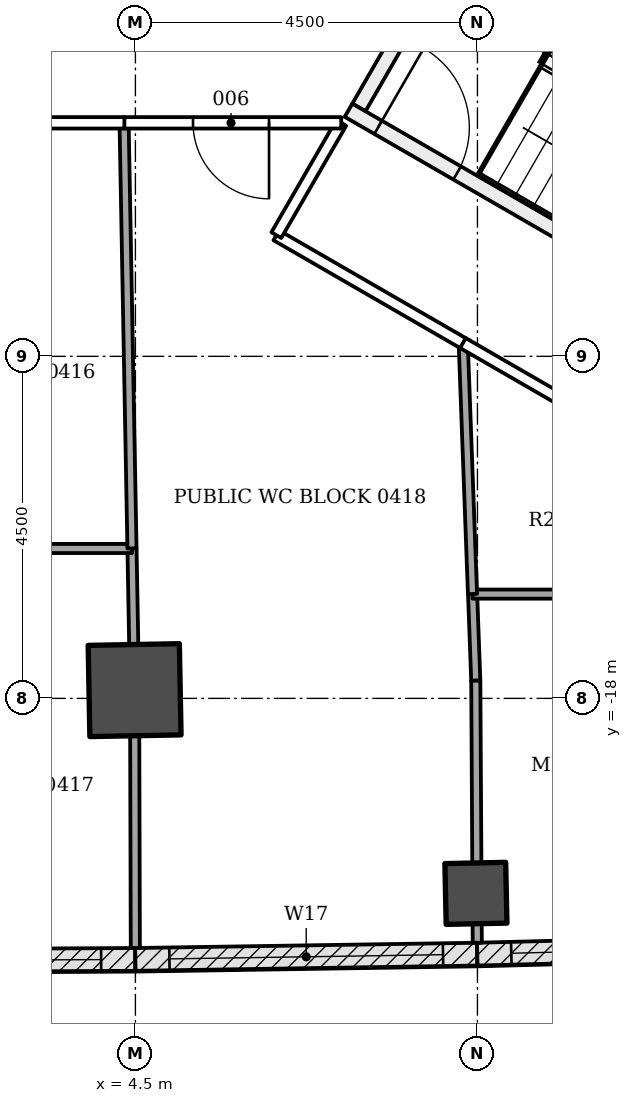
"""IFC4 building model, lengths in metres.
Left out: names, types, materials, properties, quantities, classifications, styles, units other than length and angle.
Written with IfcOpenShell. Run it as: python <this file> out.ifc"""

import sys

from ifc_helpers import new_model, si_unit, direction, frame, frame_2d, origin, origin_2d, place, context, subcontext, project, spatial, rectangle, extrude, element, fill, save


model = new_model("IFC4")
c1 = context("Model", 3, precision=1e-05, world=origin(), true_north=direction((0.0, 1.0)))
c2 = subcontext(c1, "Body", "Model", "MODEL_VIEW")
j1 = project(units=[si_unit("LENGTHUNIT", "METRE"), si_unit("PLANEANGLEUNIT", "RADIAN")], contexts=[c1])
p1 = place(None, origin())
s1 = spatial("IfcSite", under=j1, at=p1, CompositionType="ELEMENT")
p2 = place(p1, origin())
s2 = spatial("IfcBuilding", under=s1, at=p2, CompositionType="ELEMENT")
p3 = place(p2, frame((0.0, 0.0, 19.5)))
s3 = spatial("IfcBuildingStorey", under=s2, at=p3, CompositionType="ELEMENT", Elevation=19.5)
p4 = place(p3, frame((4.49, -17.892, -0.25), z_axis=(0.0, 0.0, 1.0), x_axis=(0.018552831126, -0.999827881416, 0.0)))
e1 = element("IfcColumn", 1, at=p4, inside=s3, PredefinedType="COLUMN", context=c2, shape_type="SweptSolid", body=[
    extrude(rectangle(XDim=1.2, YDim=1.2, at=origin_2d()), origin(), (0.0, 0.0, 1.0), 4.55),
])
p5 = place(p3, frame((8.98, -20.565, -0.25), z_axis=(0.0, 0.0, 1.0), x_axis=(0.020537122929, -0.99978909105, 0.0)))
e2 = element("IfcColumn", 2, at=p5, inside=s3, PredefinedType="COLUMN", context=c2, shape_type="SweptSolid", body=[
    extrude(rectangle(XDim=0.8, YDim=0.8, at=origin_2d()), origin(), (0.0, 0.0, 1.0), 4.55),
])
p6 = place(p3, frame((9.922, -5.728, -0.25), z_axis=(0.0, 0.0, 1.0), x_axis=(0.866028046028, -0.499995423472, 0.0)))
e3 = element("IfcWall", 3, at=p6, inside=s3, PredefinedType="SHEAR", context=c2, shape_type="SweptSolid", body=[
    extrude(rectangle(XDim=14.633, YDim=0.9, at=frame_2d((7.316, 0.0))), origin(), (0.0, 0.0, 1.0), 4.55),
])
p7 = place(p6, frame((7.35, 0.0, 0.25)))
e4 = element("IfcOpeningElement", 4, at=p7, cuts=e3, PredefinedType="OPENING", context=c2, shape_type="SweptSolid", body=[
    extrude(rectangle(XDim=1.5, YDim=2.1, at=frame_2d((0.75, 1.05))), frame((0.0, 0.46, 0.0), z_axis=(0.0, -1.0, 0.0), x_axis=(1.0, 0.0, 0.0)), (0.0, 0.0, 1.0), 0.92),
])
p8 = place(p3, frame((4.497, -21.434, 0.0), z_axis=(0.0, 0.0, 1.0), x_axis=(-0.999986693461, -0.005158769258, 0.0)))
e5 = element("IfcWall", 5, at=p8, inside=s3, PredefinedType="NOTDEFINED", context=c2, shape_type="SweptSolid", body=[
    extrude(rectangle(XDim=4.496, YDim=0.3, at=frame_2d((2.248, 0.0))), origin(), (0.0, 0.0, 1.0), 4.3),
])
p9 = place(p8, frame((0.448, 0.0, 1.5)))
e6 = element("IfcOpeningElement", 6, at=p9, cuts=e5, PredefinedType="OPENING", context=c2, shape_type="SweptSolid", body=[
    extrude(rectangle(XDim=3.6, YDim=1.8, at=frame_2d((1.8, 0.9))), frame((0.0, 0.16, 0.0), z_axis=(0.0, -1.0, 0.0), x_axis=(1.0, 0.0, 0.0)), (0.0, 0.0, 1.0), 0.32),
])
p10 = place(p3, frame((8.995, -21.365, 0.0), z_axis=(0.0, 0.0, 1.0), x_axis=(-0.999881921814, -0.015366926462, 0.0)))
e7 = element("IfcWall", 7, at=p10, inside=s3, PredefinedType="NOTDEFINED", context=c2, shape_type="SweptSolid", body=[
    extrude(rectangle(XDim=4.496, YDim=0.3, at=frame_2d((2.248, 0.0))), origin(), (0.0, 0.0, 1.0), 4.3),
])
p11 = place(p10, frame((0.448, 0.0, 1.5)))
e8 = element("IfcOpeningElement", 8, at=p11, cuts=e7, PredefinedType="OPENING", context=c2, shape_type="SweptSolid", body=[
    extrude(rectangle(XDim=3.6, YDim=1.8, at=frame_2d((1.8, 0.9))), frame((0.0, 0.16, 0.0), z_axis=(0.0, -1.0, 0.0), x_axis=(1.0, 0.0, 0.0)), (0.0, 0.0, 1.0), 0.32),
])
p12 = place(p3, frame((13.492, -21.25, 0.0), z_axis=(0.0, 0.0, 1.0), x_axis=(-0.999671466587, -0.025631209312, 0.0)))
e9 = element("IfcWall", 9, at=p12, inside=s3, PredefinedType="NOTDEFINED", context=c2, shape_type="SweptSolid", body=[
    extrude(rectangle(XDim=4.496, YDim=0.3, at=frame_2d((2.248, 0.0))), origin(), (0.0, 0.0, 1.0), 4.3),
])
p13 = place(p12, frame((0.448, 0.0, 1.5)))
e10 = element("IfcOpeningElement", 10, at=p13, cuts=e9, PredefinedType="OPENING", context=c2, shape_type="SweptSolid", body=[
    extrude(rectangle(XDim=3.6, YDim=1.8, at=frame_2d((1.8, 0.9))), frame((0.0, 0.16, 0.0), z_axis=(0.0, -1.0, 0.0), x_axis=(1.0, 0.0, 0.0)), (0.0, 0.0, 1.0), 0.32),
])
p14 = place(p3, frame((7.44, -10.226, -0.25), z_axis=(0.0, 0.0, 1.0), x_axis=(0.500022077904, 0.866012656725, 0.0)))
e11 = element("IfcWall", 11, at=p14, inside=s3, PredefinedType="SHEAR", context=c2, shape_type="SweptSolid", body=[
    extrude(rectangle(XDim=3.55, YDim=0.2, at=frame_2d((1.775, 0.0))), origin(), (0.0, 0.0, 1.0), 4.55),
])
p15 = place(p14, frame((1.175, 0.0, 0.25)))
e12 = element("IfcOpeningElement", 12, at=p15, cuts=e11, PredefinedType="OPENING", context=c2, shape_type="SweptSolid", body=[
    extrude(rectangle(XDim=1.2, YDim=2.1, at=frame_2d((0.6, 1.05))), frame((0.0, 0.11, 0.0), z_axis=(0.0, -1.0, 0.0), x_axis=(1.0, 0.0, 0.0)), (0.0, 0.0, 1.0), 0.22),
])
p16 = place(p3, frame((7.304, -10.262, -0.25), z_axis=(0.0, 0.0, 1.0), x_axis=(0.866026594901, -0.49999793692, 0.0)))
e13 = element("IfcWall", 13, at=p16, inside=s3, PredefinedType="SHEAR", context=c2, shape_type="SweptSolid", body=[
    extrude(rectangle(XDim=5.6, YDim=0.2, at=frame_2d((2.8, 0.0))), origin(), (0.0, 0.0, 1.0), 4.55),
])
p17 = place(p16, frame((0.45, 0.0, 0.25)))
e14 = element("IfcOpeningElement", 14, at=p17, cuts=e13, PredefinedType="OPENING", context=c2, shape_type="SweptSolid", body=[
    extrude(rectangle(XDim=1.2, YDim=2.1, at=frame_2d((0.6, 1.05))), frame((0.0, 0.11, 0.0), z_axis=(0.0, -1.0, 0.0), x_axis=(1.0, 0.0, 0.0)), (0.0, 0.0, 1.0), 0.22),
])
p18 = place(p3, frame((9.413, -6.61, -0.25), z_axis=(0.0, 0.0, 1.0), x_axis=(0.866018442252, -0.500012057535, 0.0)))
e15 = element("IfcWall", 15, at=p18, inside=s3, PredefinedType="SHEAR", context=c2, shape_type="SweptSolid", body=[
    extrude(rectangle(XDim=7.2, YDim=1.136, at=frame_2d((3.6, 0.0))), origin(), (0.0, 0.0, 1.0), 4.55),
])
p19 = place(p3, frame((4.478, -17.291, 0.0), z_axis=(0.0, 0.0, 1.0), x_axis=(-0.018108783452, 0.999836022537, 0.0)))
e16 = element("IfcWall", 16, at=p19, inside=s3, PredefinedType="PARTITIONING", context=c2, shape_type="SweptSolid", body=[
    extrude(rectangle(XDim=1.267, YDim=0.12, at=frame_2d((0.634, 0.0))), origin(), (0.0, 0.0, 1.0), 3.698),
])
p20 = place(p3, frame((4.499, -21.284, 0.0), z_axis=(0.0, 0.0, 1.0), x_axis=(-0.00288561233, 0.999995836612, 0.0)))
e17 = element("IfcWall", 17, at=p20, inside=s3, PredefinedType="PARTITIONING", context=c2, shape_type="SweptSolid", body=[
    extrude(rectangle(XDim=2.792, YDim=0.12, at=frame_2d((1.396, 0.0))), origin(), (0.0, 0.0, 1.0), 3.683),
])
p21 = place(p3, frame((4.455, -16.028, 0.0), z_axis=(0.0, 0.0, 1.0), x_axis=(-1.0, 0.0, 0.0)))
e18 = element("IfcWall", 18, at=p21, inside=s3, PredefinedType="PARTITIONING", context=c2, shape_type="SweptSolid", body=[
    extrude(rectangle(XDim=4.455, YDim=0.12, at=frame_2d((2.228, 0.0))), origin(), (0.0, 0.0, 1.0), 3.688),
])
p22 = place(p21, frame((1.75, 0.0, 0.0)))
e19 = element("IfcOpeningElement", 19, at=p22, cuts=e18, PredefinedType="OPENING", context=c2, shape_type="SweptSolid", body=[
    extrude(rectangle(XDim=1.0, YDim=2.1, at=frame_2d((0.5, 1.05))), frame((0.0, 0.07, 0.0), z_axis=(0.0, -1.0, 0.0), x_axis=(1.0, 0.0, 0.0)), (0.0, 0.0, 1.0), 0.14),
])
p23 = place(p3, frame((8.936, -16.624, 0.0), z_axis=(0.0, 0.0, 1.0), x_axis=(0.036711673362, -0.999325899314, 0.0)))
e20 = element("IfcWall", 20, at=p23, inside=s3, PredefinedType="PARTITIONING", context=c2, shape_type="SweptSolid", body=[
    extrude(rectangle(XDim=1.144, YDim=0.12, at=frame_2d((0.572, 0.0))), origin(), (0.0, 0.0, 1.0), 3.18),
])
p24 = place(p3, frame((8.978, -17.767, 0.0), z_axis=(0.0, 0.0, 1.0), x_axis=(0.005803200997, -0.999983161287, 0.0)))
e21 = element("IfcWall", 21, at=p24, inside=s3, PredefinedType="PARTITIONING", context=c2, shape_type="SweptSolid", body=[
    extrude(rectangle(XDim=2.398, YDim=0.12, at=frame_2d((1.199, 0.0))), origin(), (0.0, 0.0, 1.0), 3.18),
])
p25 = place(p3, frame((8.996, -20.965, 0.0), z_axis=(0.0, 0.0, 1.0), x_axis=(0.007812261592, -0.999969483819, 0.0)))
e22 = element("IfcWall", 22, at=p25, inside=s3, PredefinedType="PARTITIONING", context=c2, shape_type="SweptSolid", body=[
    extrude(rectangle(XDim=0.25, YDim=0.12, at=frame_2d((0.125, 0.0))), origin(), (0.0, 0.0, 1.0), 4.3),
])
p26 = place(p3, frame((13.411, -16.628, 0.0), z_axis=(0.0, 0.0, 1.0), x_axis=(-1.0, 0.0, 0.0)))
e23 = element("IfcWall", 23, at=p26, inside=s3, PredefinedType="PARTITIONING", context=c2, shape_type="SweptSolid", body=[
    extrude(rectangle(XDim=4.476, YDim=0.12, at=frame_2d((2.238, 0.0))), origin(), (0.0, 0.0, 1.0), 3.843),
])
p27 = place(p26, frame((1.75, 0.0, 0.0)))
e24 = element("IfcOpeningElement", 24, at=p27, cuts=e23, PredefinedType="OPENING", context=c2, shape_type="SweptSolid", body=[
    extrude(rectangle(XDim=1.0, YDim=2.1, at=frame_2d((0.5, 1.05))), frame((0.0, 0.07, 0.0), z_axis=(0.0, -1.0, 0.0), x_axis=(1.0, 0.0, 0.0)), (0.0, 0.0, 1.0), 0.14),
])
p28 = place(p3, frame((8.935, -16.627, 0.0), z_axis=(0.0, 0.0, 1.0), x_axis=(-0.036989770664, 0.999315644262, 0.0)))
e25 = element("IfcWall", 25, at=p28, inside=s3, PredefinedType="PARTITIONING", context=c2, shape_type="SweptSolid", body=[
    extrude(rectangle(XDim=3.3, YDim=0.12, at=frame_2d((1.65, 0.0))), origin(), (0.0, 0.0, 1.0), 3.843),
])
p29 = place(p3, frame((4.351, -10.429, 0.0), z_axis=(0.0, 0.0, 1.0), x_axis=(0.018575076386, -0.999827468385, 0.0)))
e26 = element("IfcWall", 26, at=p29, inside=s3, PredefinedType="PARTITIONING", context=c2, shape_type="SweptSolid", body=[
    extrude(rectangle(XDim=5.599, YDim=0.12, at=frame_2d((2.8, 0.0))), origin(), (0.0, 0.0, 1.0), 3.698),
])
p30 = place(p3, frame((8.817, -13.33, 0.0), z_axis=(0.0, 0.0, 1.0), x_axis=(-0.865999736111, 0.50004445508, 0.0)))
e27 = element("IfcWall", 27, at=p30, inside=s3, PredefinedType="PARTITIONING", context=c2, shape_type="SweptSolid", body=[
    extrude(rectangle(XDim=2.844, YDim=0.15, at=frame_2d((1.422, 0.0))), origin(), (0.0, 0.0, 1.0), 3.843),
])
p31 = place(p3, frame((6.354, -11.906, 0.0), z_axis=(0.0, 0.0, 1.0), x_axis=(0.500539815233, 0.865713516913, 0.0)))
e28 = element("IfcWall", 28, at=p31, inside=s3, PredefinedType="PARTITIONING", context=c2, shape_type="SweptSolid", body=[
    extrude(rectangle(XDim=1.706, YDim=0.15, at=frame_2d((0.853, 0.0))), origin(), (0.0, 0.0, 1.0), 4.3),
])
p32 = place(p3, frame((7.208, -10.428, 0.0), z_axis=(0.0, 0.0, 1.0), x_axis=(-1.0, 0.0, 0.0)))
e29 = element("IfcWall", 29, at=p32, inside=s3, PredefinedType="PARTITIONING", context=c2, shape_type="SweptSolid", body=[
    extrude(rectangle(XDim=2.861, YDim=0.15, at=frame_2d((1.431, 0.0))), origin(), (0.0, 0.0, 1.0), 3.698),
])
p33 = place(p32, frame((0.95, 0.0, 0.0)))
e30 = element("IfcOpeningElement", 30, at=p33, cuts=e29, PredefinedType="OPENING", context=c2, shape_type="SweptSolid", body=[
    extrude(rectangle(XDim=1.0, YDim=2.1, at=frame_2d((0.5, 1.05))), frame((0.0, 0.085, 0.0), z_axis=(0.0, -1.0, 0.0), x_axis=(1.0, 0.0, 0.0)), (0.0, 0.0, 1.0), 0.17),
])
p34 = place(p3, frame((13.377, -15.963, 0.0), z_axis=(0.0, 0.0, 1.0), x_axis=(-0.865969754012, 0.500096375847, 0.0)))
e31 = element("IfcWall", 31, at=p34, inside=s3, PredefinedType="PARTITIONING", context=c2, shape_type="SweptSolid", body=[
    extrude(rectangle(XDim=5.275, YDim=0.15, at=frame_2d((2.637, 0.0))), origin(), (0.0, 0.0, 1.0), 3.843),
])
p35 = place(p34, frame((2.15, 0.0, 0.0)))
e32 = element("IfcOpeningElement", 32, at=p35, cuts=e31, PredefinedType="OPENING", context=c2, shape_type="SweptSolid", body=[
    extrude(rectangle(XDim=1.0, YDim=2.1, at=frame_2d((0.5, 1.05))), frame((0.0, 0.085, 0.0), z_axis=(0.0, -1.0, 0.0), x_axis=(1.0, 0.0, 0.0)), (0.0, 0.0, 1.0), 0.17),
])
p36 = place(p3, frame((4.355, -10.428, 0.0), z_axis=(0.0, 0.0, 1.0), x_axis=(-1.0, 0.0, 0.0)))
e33 = element("IfcWall", 33, at=p36, inside=s3, PredefinedType="PARTITIONING", context=c2, shape_type="SweptSolid", body=[
    extrude(rectangle(XDim=4.359, YDim=0.15, at=frame_2d((2.179, 0.0))), origin(), (0.0, 0.0, 1.0), 3.688),
])
p37 = place(p36, frame((1.65, 0.0, 0.0)))
e34 = element("IfcOpeningElement", 34, at=p37, cuts=e33, PredefinedType="OPENING", context=c2, shape_type="SweptSolid", body=[
    extrude(rectangle(XDim=1.0, YDim=2.1, at=frame_2d((0.5, 1.05))), frame((0.0, 0.085, 0.0), z_axis=(0.0, -1.0, 0.0), x_axis=(1.0, 0.0, 0.0)), (0.0, 0.0, 1.0), 0.17),
])
p38 = place(p9, origin())
e35 = element("IfcWindow", 35, at=p38, inside=s3, PartitioningType="SINGLE_PANEL", PredefinedType="WINDOW", context=c2, shape_type="SweptSolid", body=[
    extrude(rectangle(XDim=3.6, YDim=1.8, at=frame_2d((1.8, 0.9))), frame((0.0, 0.03, 0.0), z_axis=(0.0, -1.0, 0.0), x_axis=(1.0, 0.0, 0.0)), (0.0, 0.0, 1.0), 0.06),
])
fill(e6, e35)
p39 = place(p11, origin())
e36 = element("IfcWindow", 36, at=p39, inside=s3, PartitioningType="SINGLE_PANEL", PredefinedType="WINDOW", context=c2, shape_type="SweptSolid", body=[
    extrude(rectangle(XDim=3.6, YDim=1.8, at=frame_2d((1.8, 0.9))), frame((0.0, 0.03, 0.0), z_axis=(0.0, -1.0, 0.0), x_axis=(1.0, 0.0, 0.0)), (0.0, 0.0, 1.0), 0.06),
])
fill(e8, e36)
p40 = place(p13, origin())
e37 = element("IfcWindow", 37, at=p40, inside=s3, PartitioningType="SINGLE_PANEL", PredefinedType="WINDOW", context=c2, shape_type="SweptSolid", body=[
    extrude(rectangle(XDim=3.6, YDim=1.8, at=frame_2d((1.8, 0.9))), frame((0.0, 0.03, 0.0), z_axis=(0.0, -1.0, 0.0), x_axis=(1.0, 0.0, 0.0)), (0.0, 0.0, 1.0), 0.06),
])
fill(e10, e37)
p41 = place(p17, origin())
e38 = element("IfcDoor", 38, at=p41, inside=s3, OperationType="SINGLE_SWING_LEFT", PredefinedType="DOOR", context=c2, shape_type="SweptSolid", body=[
    extrude(rectangle(XDim=1.2, YDim=2.1, at=frame_2d((0.6, 1.05))), frame((0.0, 0.025, 0.0), z_axis=(0.0, -1.0, 0.0), x_axis=(1.0, 0.0, 0.0)), (0.0, 0.0, 1.0), 0.05),
])
fill(e14, e38)
p42 = place(p33, origin())
e39 = element("IfcDoor", 39, at=p42, inside=s3, OperationType="SINGLE_SWING_RIGHT", PredefinedType="DOOR", context=c2, shape_type="SweptSolid", body=[
    extrude(rectangle(XDim=1.0, YDim=2.1, at=frame_2d((0.5, 1.05))), frame((0.0, 0.025, 0.0), z_axis=(0.0, -1.0, 0.0), x_axis=(1.0, 0.0, 0.0)), (0.0, 0.0, 1.0), 0.05),
])
fill(e30, e39)
save(model, sys.argv[1])
